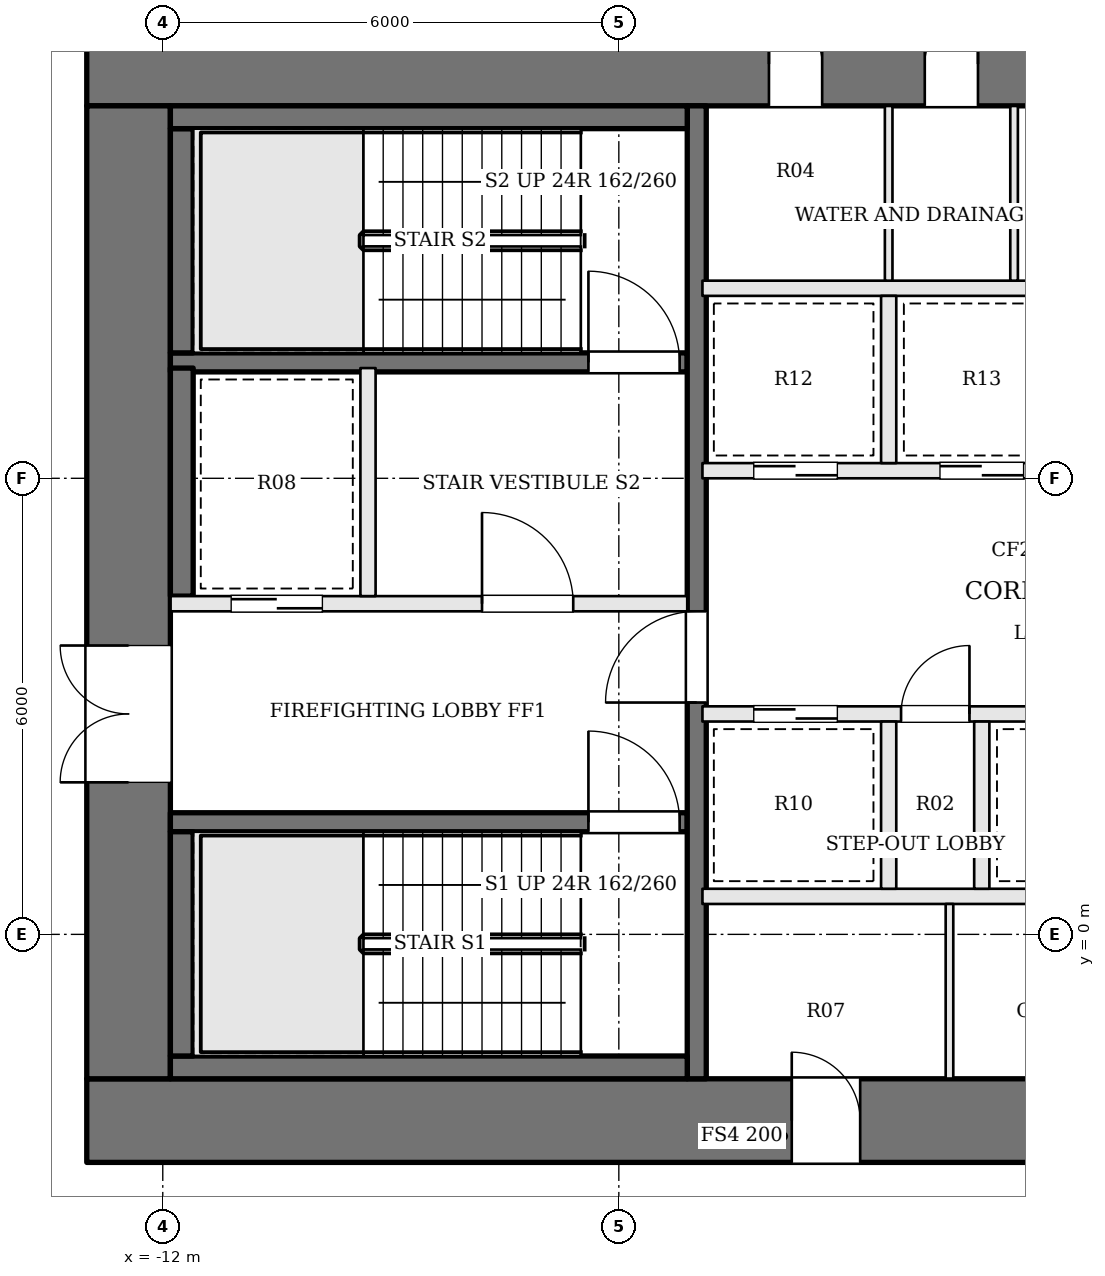
"""IFC4 building model, lengths in metres.
Left out: names, types, materials, properties, quantities, classifications, styles, units other than length and angle.
Written with IfcOpenShell. Run it as: python <this file> out.ifc"""

import sys

from ifc_helpers import new_model, si_unit, direction, frame, frame_2d, origin, place, context, subcontext, project, spatial, rectangle, extrude, element, fill, save


model = new_model("IFC4")
c1 = context("Model", 3, precision=1e-05, world=origin(), true_north=direction((0.0, 1.0)))
c2 = subcontext(c1, "Body", "Model", "MODEL_VIEW")
j1 = project(units=[si_unit("LENGTHUNIT", "METRE"), si_unit("PLANEANGLEUNIT", "RADIAN")], contexts=[c1])
p1 = place(None, origin())
s1 = spatial("IfcSite", under=j1, at=p1, CompositionType="ELEMENT")
p2 = place(p1, origin())
s2 = spatial("IfcBuilding", under=s1, at=p2, CompositionType="ELEMENT")
p3 = place(p2, frame((0.0, 0.0, 165.6)))
s3 = spatial("IfcBuildingStorey", under=s2, at=p3, CompositionType="ELEMENT", Elevation=165.6)
p4 = place(p3, frame((-13.0, 11.45, 0.0), z_axis=(0.0, 0.0, 1.0), x_axis=(1.0, 0.0, 0.0)))
e1 = element("IfcWall", 1, at=p4, inside=s3, PredefinedType="SHEAR", context=c2, shape_type="SweptSolid", body=[
    extrude(rectangle(XDim=26.0, YDim=1.1, at=frame_2d((13.0, 0.0))), origin(), (0.0, 0.0, 1.0), 3.9),
])
p5 = place(p4, frame((8.975, 0.0, 0.0)))
e2 = element("IfcOpeningElement", 2, at=p5, cuts=e1, PredefinedType="OPENING", context=c2, shape_type="SweptSolid", body=[
    extrude(rectangle(XDim=0.7, YDim=2.1, at=frame_2d((0.35, 1.05))), frame((0.0, 0.56, 0.0), z_axis=(0.0, -1.0, 0.0), x_axis=(1.0, 0.0, 0.0)), (0.0, 0.0, 1.0), 1.12),
])
p6 = place(p4, frame((11.025, 0.0, 0.0)))
e3 = element("IfcOpeningElement", 3, at=p6, cuts=e1, PredefinedType="OPENING", context=c2, shape_type="SweptSolid", body=[
    extrude(rectangle(XDim=0.7, YDim=2.1, at=frame_2d((0.35, 1.05))), frame((0.0, 0.56, 0.0), z_axis=(0.0, -1.0, 0.0), x_axis=(1.0, 0.0, 0.0)), (0.0, 0.0, 1.0), 1.12),
])
p7 = place(p4, frame((12.925, 0.0, 0.0)))
e4 = element("IfcOpeningElement", 4, at=p7, cuts=e1, PredefinedType="OPENING", context=c2, shape_type="SweptSolid", body=[
    extrude(rectangle(XDim=1.0, YDim=2.1, at=frame_2d((0.5, 1.05))), frame((0.0, 0.56, 0.0), z_axis=(0.0, -1.0, 0.0), x_axis=(1.0, 0.0, 0.0)), (0.0, 0.0, 1.0), 1.12),
])
p8 = place(p4, frame((15.775, 0.0, 0.0)))
e5 = element("IfcOpeningElement", 5, at=p8, cuts=e1, PredefinedType="OPENING", context=c2, shape_type="SweptSolid", body=[
    extrude(rectangle(XDim=1.0, YDim=2.1, at=frame_2d((0.5, 1.05))), frame((0.0, 0.56, 0.0), z_axis=(0.0, -1.0, 0.0), x_axis=(1.0, 0.0, 0.0)), (0.0, 0.0, 1.0), 1.12),
])
p9 = place(p3, frame((-13.0, -2.45, 0.0), z_axis=(0.0, 0.0, 1.0), x_axis=(1.0, 0.0, 0.0)))
e6 = element("IfcWall", 6, at=p9, inside=s3, PredefinedType="SHEAR", context=c2, shape_type="SweptSolid", body=[
    extrude(rectangle(XDim=26.0, YDim=1.1, at=frame_2d((13.0, 0.0))), origin(), (0.0, 0.0, 1.0), 3.9),
])
p10 = place(p9, frame((9.275, 0.0, 0.0)))
e7 = element("IfcOpeningElement", 7, at=p10, cuts=e6, PredefinedType="OPENING", context=c2, shape_type="SweptSolid", body=[
    extrude(rectangle(XDim=0.9, YDim=2.1, at=frame_2d((0.45, 1.05))), frame((0.0, 0.56, 0.0), z_axis=(0.0, -1.0, 0.0), x_axis=(1.0, 0.0, 0.0)), (0.0, 0.0, 1.0), 1.12),
])
p11 = place(p9, frame((12.525, 0.0, 0.0)))
e8 = element("IfcOpeningElement", 8, at=p11, cuts=e6, PredefinedType="OPENING", context=c2, shape_type="SweptSolid", body=[
    extrude(rectangle(XDim=0.9, YDim=2.1, at=frame_2d((0.45, 1.05))), frame((0.0, 0.56, 0.0), z_axis=(0.0, -1.0, 0.0), x_axis=(1.0, 0.0, 0.0)), (0.0, 0.0, 1.0), 1.12),
])
p12 = place(p9, frame((15.0, 0.0, 0.0)))
e9 = element("IfcOpeningElement", 9, at=p12, cuts=e6, PredefinedType="OPENING", context=c2, shape_type="SweptSolid", body=[
    extrude(rectangle(XDim=1.0, YDim=2.1, at=frame_2d((0.5, 1.05))), frame((0.0, 0.56, 0.0), z_axis=(0.0, -1.0, 0.0), x_axis=(1.0, 0.0, 0.0)), (0.0, 0.0, 1.0), 1.12),
])
p13 = place(p9, frame((16.7, 0.0, 0.0)))
e10 = element("IfcOpeningElement", 10, at=p13, cuts=e6, PredefinedType="OPENING", context=c2, shape_type="SweptSolid", body=[
    extrude(rectangle(XDim=0.9, YDim=2.1, at=frame_2d((0.45, 1.05))), frame((0.0, 0.56, 0.0), z_axis=(0.0, -1.0, 0.0), x_axis=(1.0, 0.0, 0.0)), (0.0, 0.0, 1.0), 1.12),
])
p14 = place(p3, frame((-12.45, -1.9, 0.0), z_axis=(0.0, 0.0, 1.0), x_axis=(0.0, 1.0, 0.0)))
e11 = element("IfcWall", 11, at=p14, inside=s3, PredefinedType="SHEAR", context=c2, shape_type="SweptSolid", body=[
    extrude(rectangle(XDim=12.8, YDim=1.1, at=frame_2d((6.4, 0.0))), origin(), (0.0, 0.0, 1.0), 3.9),
])
p15 = place(p14, frame((3.9, 0.0, 0.0)))
e12 = element("IfcOpeningElement", 12, at=p15, cuts=e11, PredefinedType="OPENING", context=c2, shape_type="SweptSolid", body=[
    extrude(rectangle(XDim=1.8, YDim=2.1, at=frame_2d((0.9, 1.05))), frame((0.0, 0.56, 0.0), z_axis=(0.0, -1.0, 0.0), x_axis=(1.0, 0.0, 0.0)), (0.0, 0.0, 1.0), 1.12),
])
p16 = place(p3, frame((-11.9, 1.475, 0.0), z_axis=(0.0, 0.0, 1.0), x_axis=(1.0, 0.0, 0.0)))
e13 = element("IfcWall", 13, at=p16, inside=s3, PredefinedType="SOLIDWALL", context=c2, shape_type="SweptSolid", body=[
    extrude(rectangle(XDim=6.8, YDim=0.25, at=frame_2d((3.4, 0.0))), origin(), (0.0, 0.0, 1.0), 3.6),
])
p17 = place(p16, frame((5.5, 0.0, 0.0)))
e14 = element("IfcOpeningElement", 14, at=p17, cuts=e13, PredefinedType="OPENING", context=c2, shape_type="SweptSolid", body=[
    extrude(rectangle(XDim=1.2, YDim=2.1, at=frame_2d((0.6, 1.05))), frame((0.0, 0.135, 0.0), z_axis=(0.0, -1.0, 0.0), x_axis=(1.0, 0.0, 0.0)), (0.0, 0.0, 1.0), 0.27),
])
p18 = place(p3, frame((-11.9, 4.35, 0.0), z_axis=(0.0, 0.0, 1.0), x_axis=(1.0, 0.0, 0.0)))
e15 = element("IfcWall", 15, at=p18, inside=s3, PredefinedType="SOLIDWALL", context=c2, shape_type="SweptSolid", body=[
    extrude(rectangle(XDim=6.8, YDim=0.2, at=frame_2d((3.4, 0.0))), origin(), (0.0, 0.0, 1.0), 3.6),
])
p19 = place(p18, frame((4.1, 0.0, 0.0)))
e16 = element("IfcOpeningElement", 16, at=p19, cuts=e15, PredefinedType="OPENING", context=c2, shape_type="SweptSolid", body=[
    extrude(rectangle(XDim=1.2, YDim=2.1, at=frame_2d((0.6, 1.05))), frame((0.0, 0.11, 0.0), z_axis=(0.0, -1.0, 0.0), x_axis=(1.0, 0.0, 0.0)), (0.0, 0.0, 1.0), 0.22),
])
p20 = place(p18, frame((0.8, 0.0, 0.0)))
e17 = element("IfcOpeningElement", 17, at=p20, cuts=e15, PredefinedType="OPENING", context=c2, shape_type="SweptSolid", body=[
    extrude(rectangle(XDim=1.2, YDim=2.1, at=frame_2d((0.6, 1.05))), frame((0.0, 0.11, 0.0), z_axis=(0.0, -1.0, 0.0), x_axis=(1.0, 0.0, 0.0)), (0.0, 0.0, 1.0), 0.22),
])
p21 = place(p3, frame((-11.9, 7.525, 0.0), z_axis=(0.0, 0.0, 1.0), x_axis=(1.0, 0.0, 0.0)))
e18 = element("IfcWall", 18, at=p21, inside=s3, PredefinedType="SOLIDWALL", context=c2, shape_type="SweptSolid", body=[
    extrude(rectangle(XDim=6.8, YDim=0.25, at=frame_2d((3.4, 0.0))), origin(), (0.0, 0.0, 1.0), 3.6),
])
p22 = place(p21, frame((5.5, 0.0, 0.0)))
e19 = element("IfcOpeningElement", 19, at=p22, cuts=e18, PredefinedType="OPENING", context=c2, shape_type="SweptSolid", body=[
    extrude(rectangle(XDim=1.2, YDim=2.1, at=frame_2d((0.6, 1.05))), frame((0.0, 0.135, 0.0), z_axis=(0.0, -1.0, 0.0), x_axis=(1.0, 0.0, 0.0)), (0.0, 0.0, 1.0), 0.27),
])
p23 = place(p3, frame((-9.3, 4.45, 0.0), z_axis=(0.0, 0.0, 1.0), x_axis=(0.0, 1.0, 0.0)))
e20 = element("IfcWall", 20, at=p23, inside=s3, PredefinedType="SOLIDWALL", context=c2, shape_type="SweptSolid", body=[
    extrude(rectangle(XDim=3.0, YDim=0.2, at=frame_2d((1.5, 0.0))), origin(), (0.0, 0.0, 1.0), 3.6),
])
p24 = place(p3, frame((-4.975, -1.9, 0.0), z_axis=(0.0, 0.0, 1.0), x_axis=(0.0, 1.0, 0.0)))
e21 = element("IfcWall", 21, at=p24, inside=s3, PredefinedType="SOLIDWALL", context=c2, shape_type="SweptSolid", body=[
    extrude(rectangle(XDim=12.8, YDim=0.25, at=frame_2d((6.4, 0.0))), origin(), (0.0, 0.0, 1.0), 3.6),
])
p25 = place(p24, frame((4.95, 0.0, 0.0)))
e22 = element("IfcOpeningElement", 22, at=p25, cuts=e21, PredefinedType="OPENING", context=c2, shape_type="SweptSolid", body=[
    extrude(rectangle(XDim=1.2, YDim=2.1, at=frame_2d((0.6, 1.05))), frame((0.0, 0.135, 0.0), z_axis=(0.0, -1.0, 0.0), x_axis=(1.0, 0.0, 0.0)), (0.0, 0.0, 1.0), 0.27),
])
p26 = place(p3, frame((-11.9, -1.75, 0.0), z_axis=(0.0, 0.0, 1.0), x_axis=(1.0, 0.0, 0.0)))
e23 = element("IfcWall", 23, at=p26, inside=s3, PredefinedType="SOLIDWALL", context=c2, shape_type="SweptSolid", body=[
    extrude(rectangle(XDim=6.8, YDim=0.3, at=frame_2d((3.4, 0.0))), origin(), (0.0, 0.0, 1.0), 3.6),
])
p27 = place(p3, frame((-11.75, -1.6, 0.0), z_axis=(0.0, 0.0, 1.0), x_axis=(0.0, 1.0, 0.0)))
e24 = element("IfcWall", 24, at=p27, inside=s3, PredefinedType="SOLIDWALL", context=c2, shape_type="SweptSolid", body=[
    extrude(rectangle(XDim=2.95, YDim=0.3, at=frame_2d((1.475, 0.0))), origin(), (0.0, 0.0, 1.0), 3.6),
])
p28 = place(p3, frame((-11.75, 4.45, 0.0), z_axis=(0.0, 0.0, 1.0), x_axis=(0.0, 1.0, 0.0)))
e25 = element("IfcWall", 25, at=p28, inside=s3, PredefinedType="SOLIDWALL", context=c2, shape_type="SweptSolid", body=[
    extrude(rectangle(XDim=3.0, YDim=0.3, at=frame_2d((1.5, 0.0))), origin(), (0.0, 0.0, 1.0), 3.6),
])
p29 = place(p3, frame((-11.75, 7.65, 0.0), z_axis=(0.0, 0.0, 1.0), x_axis=(0.0, 1.0, 0.0)))
e26 = element("IfcWall", 26, at=p29, inside=s3, PredefinedType="SOLIDWALL", context=c2, shape_type="SweptSolid", body=[
    extrude(rectangle(XDim=2.95, YDim=0.3, at=frame_2d((1.475, 0.0))), origin(), (0.0, 0.0, 1.0), 3.6),
])
p30 = place(p3, frame((-11.9, 10.75, 0.0), z_axis=(0.0, 0.0, 1.0), x_axis=(1.0, 0.0, 0.0)))
e27 = element("IfcWall", 27, at=p30, inside=s3, PredefinedType="SOLIDWALL", context=c2, shape_type="SweptSolid", body=[
    extrude(rectangle(XDim=6.8, YDim=0.3, at=frame_2d((3.4, 0.0))), origin(), (0.0, 0.0, 1.0), 3.6),
])
p31 = place(p3, frame((-4.9, 0.5, 0.0), z_axis=(0.0, 0.0, 1.0), x_axis=(1.0, 0.0, 0.0)))
e28 = element("IfcWall", 28, at=p31, inside=s3, PredefinedType="SOLIDWALL", context=c2, shape_type="SweptSolid", body=[
    extrude(rectangle(XDim=9.8, YDim=0.2, at=frame_2d((4.9, 0.0))), origin(), (0.0, 0.0, 1.0), 3.6),
])
p32 = place(p3, frame((-4.9, 2.9, 0.0), z_axis=(0.0, 0.0, 1.0), x_axis=(1.0, 0.0, 0.0)))
e29 = element("IfcWall", 29, at=p32, inside=s3, PredefinedType="SOLIDWALL", context=c2, shape_type="SweptSolid", body=[
    extrude(rectangle(XDim=9.8, YDim=0.2, at=frame_2d((4.9, 0.0))), origin(), (0.0, 0.0, 1.0), 3.6),
])
p33 = place(p32, frame((0.675, 0.0, 0.0)))
e30 = element("IfcOpeningElement", 30, at=p33, cuts=e29, PredefinedType="OPENING", context=c2, shape_type="SweptSolid", body=[
    extrude(rectangle(XDim=1.1, YDim=2.1, at=frame_2d((0.55, 1.05))), frame((0.0, 0.11, 0.0), z_axis=(0.0, -1.0, 0.0), x_axis=(1.0, 0.0, 0.0)), (0.0, 0.0, 1.0), 0.22),
])
p34 = place(p32, frame((2.613, 0.0, 0.0)))
e31 = element("IfcOpeningElement", 31, at=p34, cuts=e29, PredefinedType="OPENING", context=c2, shape_type="SweptSolid", body=[
    extrude(rectangle(XDim=0.9, YDim=2.1, at=frame_2d((0.45, 1.05))), frame((0.0, 0.11, 0.0), z_axis=(0.0, -1.0, 0.0), x_axis=(1.0, 0.0, 0.0)), (0.0, 0.0, 1.0), 0.22),
])
p35 = place(p32, frame((4.35, 0.0, 0.0)))
e32 = element("IfcOpeningElement", 32, at=p35, cuts=e29, PredefinedType="OPENING", context=c2, shape_type="SweptSolid", body=[
    extrude(rectangle(XDim=1.1, YDim=2.1, at=frame_2d((0.55, 1.05))), frame((0.0, 0.11, 0.0), z_axis=(0.0, -1.0, 0.0), x_axis=(1.0, 0.0, 0.0)), (0.0, 0.0, 1.0), 0.22),
])
p36 = place(p32, frame((7.463, 0.0, 0.0)))
e33 = element("IfcOpeningElement", 33, at=p36, cuts=e29, PredefinedType="OPENING", context=c2, shape_type="SweptSolid", body=[
    extrude(rectangle(XDim=1.0, YDim=2.1, at=frame_2d((0.5, 1.05))), frame((0.0, 0.11, 0.0), z_axis=(0.0, -1.0, 0.0), x_axis=(1.0, 0.0, 0.0)), (0.0, 0.0, 1.0), 0.22),
])
p37 = place(p3, frame((-4.9, 6.1, 0.0), z_axis=(0.0, 0.0, 1.0), x_axis=(1.0, 0.0, 0.0)))
e34 = element("IfcWall", 34, at=p37, inside=s3, PredefinedType="SOLIDWALL", context=c2, shape_type="SweptSolid", body=[
    extrude(rectangle(XDim=9.8, YDim=0.2, at=frame_2d((4.9, 0.0))), origin(), (0.0, 0.0, 1.0), 3.6),
])
p38 = place(p37, frame((0.675, 0.0, 0.0)))
e35 = element("IfcOpeningElement", 35, at=p38, cuts=e34, PredefinedType="OPENING", context=c2, shape_type="SweptSolid", body=[
    extrude(rectangle(XDim=1.1, YDim=2.1, at=frame_2d((0.55, 1.05))), frame((0.0, 0.11, 0.0), z_axis=(0.0, -1.0, 0.0), x_axis=(1.0, 0.0, 0.0)), (0.0, 0.0, 1.0), 0.22),
])
p39 = place(p37, frame((3.125, 0.0, 0.0)))
e36 = element("IfcOpeningElement", 36, at=p39, cuts=e34, PredefinedType="OPENING", context=c2, shape_type="SweptSolid", body=[
    extrude(rectangle(XDim=1.1, YDim=2.1, at=frame_2d((0.55, 1.05))), frame((0.0, 0.11, 0.0), z_axis=(0.0, -1.0, 0.0), x_axis=(1.0, 0.0, 0.0)), (0.0, 0.0, 1.0), 0.22),
])
p40 = place(p37, frame((5.575, 0.0, 0.0)))
e37 = element("IfcOpeningElement", 37, at=p40, cuts=e34, PredefinedType="OPENING", context=c2, shape_type="SweptSolid", body=[
    extrude(rectangle(XDim=1.1, YDim=2.1, at=frame_2d((0.55, 1.05))), frame((0.0, 0.11, 0.0), z_axis=(0.0, -1.0, 0.0), x_axis=(1.0, 0.0, 0.0)), (0.0, 0.0, 1.0), 0.22),
])
p41 = place(p37, frame((8.025, 0.0, 0.0)))
e38 = element("IfcOpeningElement", 38, at=p41, cuts=e34, PredefinedType="OPENING", context=c2, shape_type="SweptSolid", body=[
    extrude(rectangle(XDim=1.1, YDim=2.1, at=frame_2d((0.55, 1.05))), frame((0.0, 0.11, 0.0), z_axis=(0.0, -1.0, 0.0), x_axis=(1.0, 0.0, 0.0)), (0.0, 0.0, 1.0), 0.22),
])
p42 = place(p3, frame((-4.9, 8.5, 0.0), z_axis=(0.0, 0.0, 1.0), x_axis=(1.0, 0.0, 0.0)))
e39 = element("IfcWall", 39, at=p42, inside=s3, PredefinedType="SOLIDWALL", context=c2, shape_type="SweptSolid", body=[
    extrude(rectangle(XDim=9.8, YDim=0.2, at=frame_2d((4.9, 0.0))), origin(), (0.0, 0.0, 1.0), 3.6),
])
for number, where, z_axis, x_axis in (
    (40, (-2.45, 0.6, 0.0), (0.0, 0.0, 1.0), (0.0, 1.0, 0.0)),
    (41, (-1.225, 0.6, 0.0), (0.0, 0.0, 1.0), (0.0, 1.0, 0.0)),
    (42, (-2.45, 6.2, 0.0), (0.0, 0.0, 1.0), (0.0, 1.0, 0.0)),
):
    element("IfcWall", number, at=place(p3, frame(where, z_axis=z_axis, x_axis=x_axis)), inside=s3, PredefinedType="SOLIDWALL", context=c2, shape_type="SweptSolid", body=[
        extrude(rectangle(XDim=2.2, YDim=0.2, at=frame_2d((1.1, 0.0))), origin(), (0.0, 0.0, 1.0), 3.6),
    ])
for number, where, z_axis, x_axis in (
    (43, (-1.65, -1.9, 0.0), (0.0, 0.0, 1.0), (0.0, 1.0, 0.0)),
    (44, (-2.45, 8.6, 0.0), (0.0, 0.0, 1.0), (0.0, 1.0, 0.0)),
    (45, (-0.8, 8.6, 0.0), (0.0, 0.0, 1.0), (0.0, 1.0, 0.0)),
):
    element("IfcWall", number, at=place(p3, frame(where, z_axis=z_axis, x_axis=x_axis)), inside=s3, PredefinedType="PARTITIONING", context=c2, shape_type="SweptSolid", body=[
        extrude(rectangle(XDim=2.3, YDim=0.1, at=frame_2d((1.15, 0.0))), origin(), (0.0, 0.0, 1.0), 3.6),
    ])
p43 = place(p15, origin())
e46 = element("IfcDoor", 46, at=p43, inside=s3, OperationType="DOUBLE_DOOR_SINGLE_SWING", PredefinedType="DOOR", context=c2, shape_type="SweptSolid", body=[
    extrude(rectangle(XDim=1.8, YDim=2.1, at=frame_2d((0.9, 1.05))), frame((0.0, 0.025, 0.0), z_axis=(0.0, -1.0, 0.0), x_axis=(1.0, 0.0, 0.0)), (0.0, 0.0, 1.0), 0.05),
])
fill(e12, e46)
p44 = place(p25, origin())
e47 = element("IfcDoor", 47, at=p44, inside=s3, OperationType="SINGLE_SWING_LEFT", PredefinedType="DOOR", context=c2, shape_type="SweptSolid", body=[
    extrude(rectangle(XDim=1.2, YDim=2.1, at=frame_2d((0.6, 1.05))), frame((0.0, 0.025, 0.0), z_axis=(0.0, -1.0, 0.0), x_axis=(1.0, 0.0, 0.0)), (0.0, 0.0, 1.0), 0.05),
])
fill(e22, e47)
p45 = place(p19, origin())
e48 = element("IfcDoor", 48, at=p45, inside=s3, OperationType="SINGLE_SWING_LEFT", PredefinedType="DOOR", context=c2, shape_type="SweptSolid", body=[
    extrude(rectangle(XDim=1.2, YDim=2.1, at=frame_2d((0.6, 1.05))), frame((0.0, 0.025, 0.0), z_axis=(0.0, -1.0, 0.0), x_axis=(1.0, 0.0, 0.0)), (0.0, 0.0, 1.0), 0.05),
])
fill(e16, e48)
p46 = place(p17, origin())
e49 = element("IfcDoor", 49, at=p46, inside=s3, OperationType="SINGLE_SWING_LEFT", PredefinedType="DOOR", context=c2, shape_type="SweptSolid", body=[
    extrude(rectangle(XDim=1.2, YDim=2.1, at=frame_2d((0.6, 1.05))), frame((0.0, 0.025, 0.0), z_axis=(0.0, -1.0, 0.0), x_axis=(1.0, 0.0, 0.0)), (0.0, 0.0, 1.0), 0.05),
])
fill(e14, e49)
p47 = place(p22, origin())
e50 = element("IfcDoor", 50, at=p47, inside=s3, OperationType="SINGLE_SWING_LEFT", PredefinedType="DOOR", context=c2, shape_type="SweptSolid", body=[
    extrude(rectangle(XDim=1.2, YDim=2.1, at=frame_2d((0.6, 1.05))), frame((0.0, 0.025, 0.0), z_axis=(0.0, -1.0, 0.0), x_axis=(1.0, 0.0, 0.0)), (0.0, 0.0, 1.0), 0.05),
])
fill(e19, e50)
p48 = place(p20, origin())
e51 = element("IfcDoor", 51, at=p48, inside=s3, OperationType="SLIDING_TO_RIGHT", PredefinedType="DOOR", context=c2, shape_type="SweptSolid", body=[
    extrude(rectangle(XDim=1.2, YDim=2.1, at=frame_2d((0.6, 1.05))), frame((0.0, 0.025, 0.0), z_axis=(0.0, -1.0, 0.0), x_axis=(1.0, 0.0, 0.0)), (0.0, 0.0, 1.0), 0.05),
])
fill(e17, e51)
p49 = place(p33, origin())
e52 = element("IfcDoor", 52, at=p49, inside=s3, OperationType="SLIDING_TO_RIGHT", PredefinedType="DOOR", context=c2, shape_type="SweptSolid", body=[
    extrude(rectangle(XDim=1.1, YDim=2.1, at=frame_2d((0.55, 1.05))), frame((0.0, 0.025, 0.0), z_axis=(0.0, -1.0, 0.0), x_axis=(1.0, 0.0, 0.0)), (0.0, 0.0, 1.0), 0.05),
])
fill(e30, e52)
p50 = place(p34, origin())
e53 = element("IfcDoor", 53, at=p50, inside=s3, OperationType="SINGLE_SWING_RIGHT", PredefinedType="DOOR", context=c2, shape_type="SweptSolid", body=[
    extrude(rectangle(XDim=0.9, YDim=2.1, at=frame_2d((0.45, 1.05))), frame((0.0, 0.025, 0.0), z_axis=(0.0, -1.0, 0.0), x_axis=(1.0, 0.0, 0.0)), (0.0, 0.0, 1.0), 0.05),
])
fill(e31, e53)
p51 = place(p38, origin())
e54 = element("IfcDoor", 54, at=p51, inside=s3, OperationType="SLIDING_TO_RIGHT", PredefinedType="DOOR", context=c2, shape_type="SweptSolid", body=[
    extrude(rectangle(XDim=1.1, YDim=2.1, at=frame_2d((0.55, 1.05))), frame((0.0, 0.025, 0.0), z_axis=(0.0, -1.0, 0.0), x_axis=(1.0, 0.0, 0.0)), (0.0, 0.0, 1.0), 0.05),
])
fill(e35, e54)
p52 = place(p39, origin())
e55 = element("IfcDoor", 55, at=p52, inside=s3, OperationType="SLIDING_TO_LEFT", PredefinedType="DOOR", context=c2, shape_type="SweptSolid", body=[
    extrude(rectangle(XDim=1.1, YDim=2.1, at=frame_2d((0.55, 1.05))), frame((0.0, 0.025, 0.0), z_axis=(0.0, -1.0, 0.0), x_axis=(1.0, 0.0, 0.0)), (0.0, 0.0, 1.0), 0.05),
])
fill(e36, e55)
p53 = place(p10, origin())
e56 = element("IfcDoor", 56, at=p53, inside=s3, OperationType="SINGLE_SWING_LEFT", PredefinedType="DOOR", context=c2, shape_type="SweptSolid", body=[
    extrude(rectangle(XDim=0.9, YDim=2.1, at=frame_2d((0.45, 1.05))), frame((0.0, 0.025, 0.0), z_axis=(0.0, -1.0, 0.0), x_axis=(1.0, 0.0, 0.0)), (0.0, 0.0, 1.0), 0.05),
])
fill(e7, e56)
p54 = place(p5, origin())
e57 = element("IfcDoor", 57, at=p54, inside=s3, OperationType="SINGLE_SWING_LEFT", PredefinedType="DOOR", context=c2, shape_type="SweptSolid", body=[
    extrude(rectangle(XDim=0.7, YDim=2.1, at=frame_2d((0.35, 1.05))), frame((0.0, 0.025, 0.0), z_axis=(0.0, -1.0, 0.0), x_axis=(1.0, 0.0, 0.0)), (0.0, 0.0, 1.0), 0.05),
])
fill(e2, e57)
p55 = place(p6, origin())
e58 = element("IfcDoor", 58, at=p55, inside=s3, OperationType="SINGLE_SWING_RIGHT", PredefinedType="DOOR", context=c2, shape_type="SweptSolid", body=[
    extrude(rectangle(XDim=0.7, YDim=2.1, at=frame_2d((0.35, 1.05))), frame((0.0, 0.025, 0.0), z_axis=(0.0, -1.0, 0.0), x_axis=(1.0, 0.0, 0.0)), (0.0, 0.0, 1.0), 0.05),
])
fill(e3, e58)
save(model, sys.argv[1])
